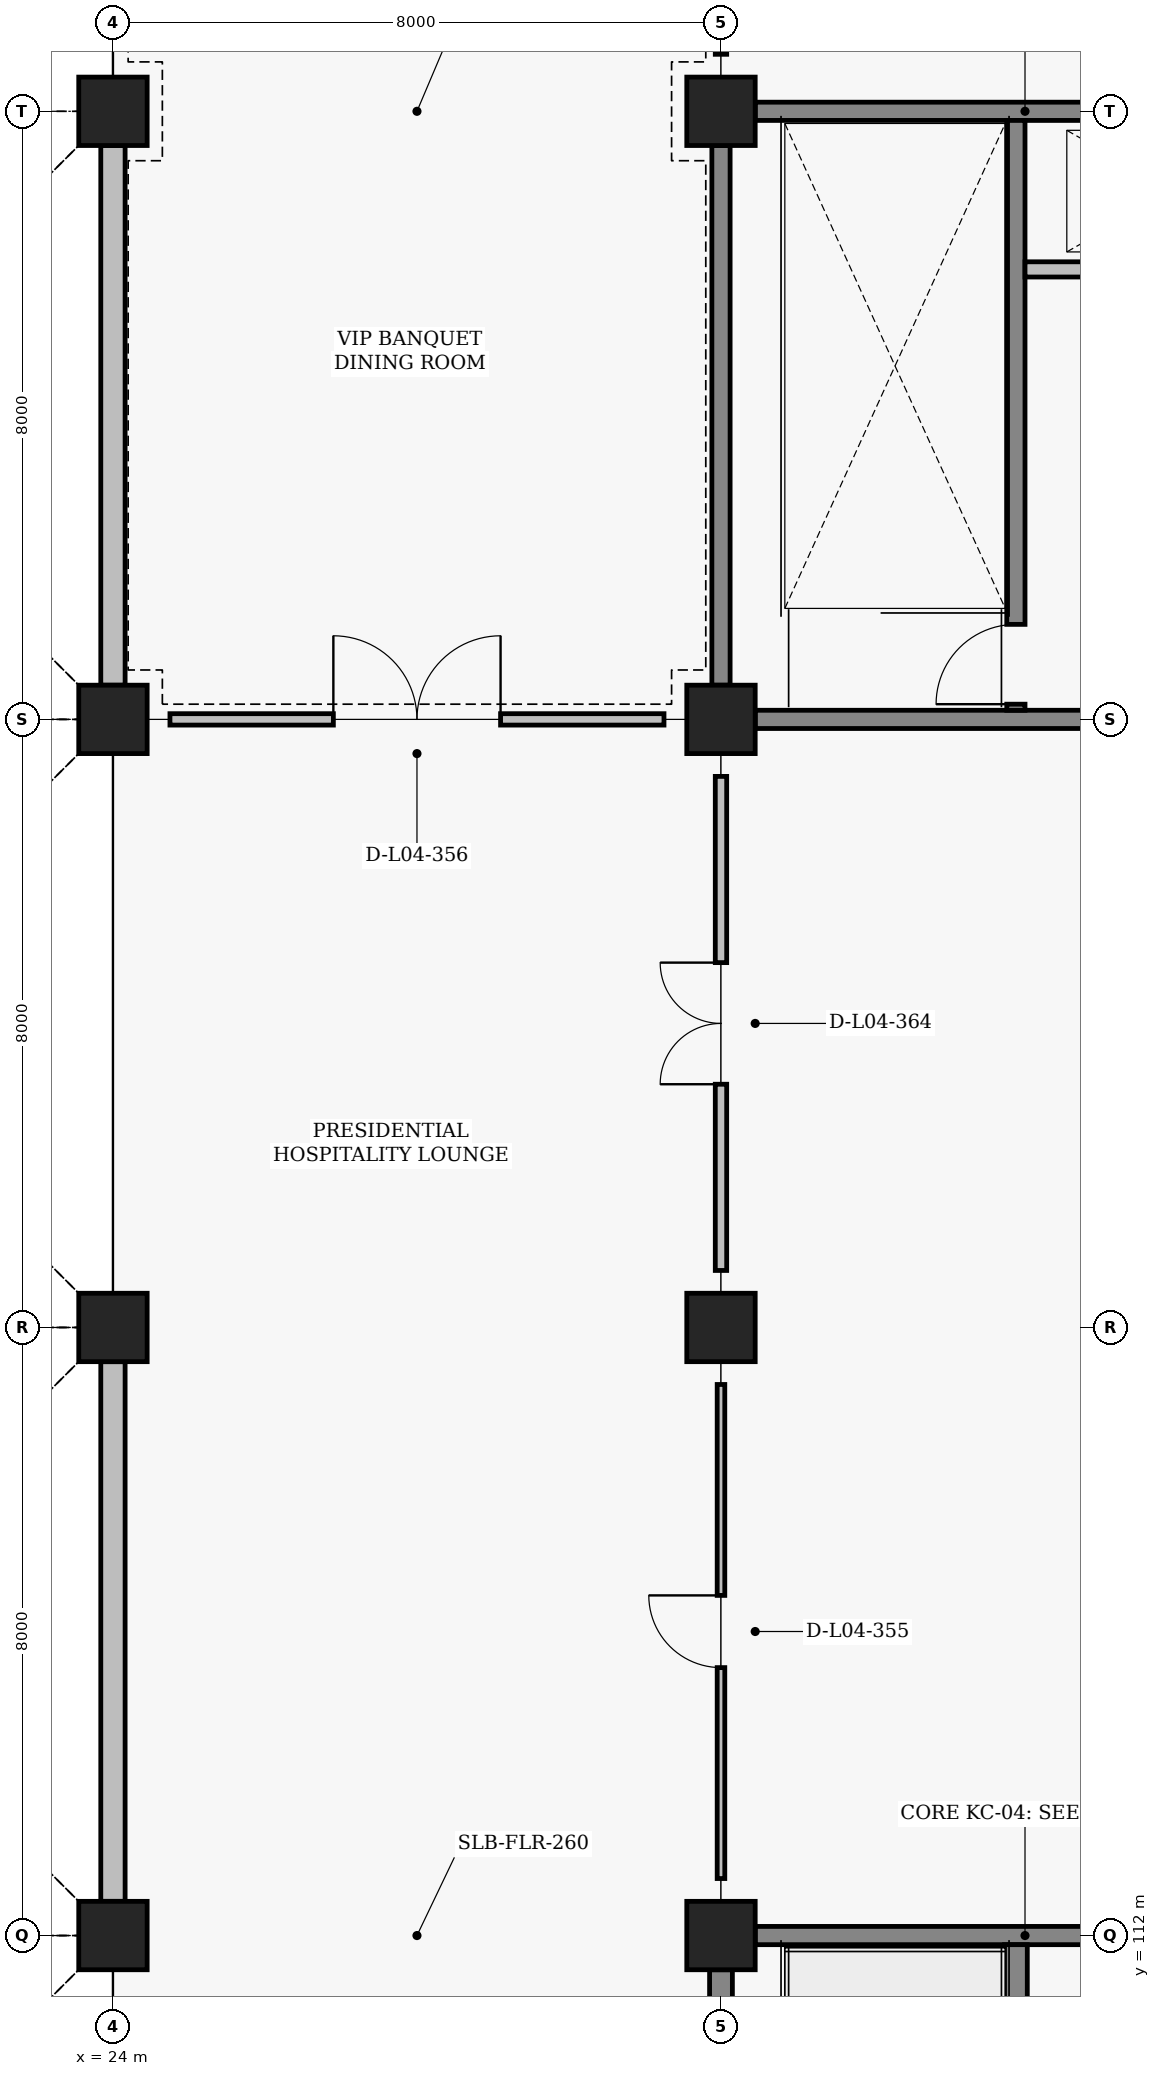
"""IFC4 building model, lengths in metres.
Left out: names, types, materials, properties, quantities, classifications, styles, units other than length and angle.
Written with IfcOpenShell. Run it as: python <this file> out.ifc"""

import sys

from ifc_helpers import new_model, si_unit, direction, frame, frame_2d, origin, origin_2d, place, context, subcontext, project, spatial, rectangle, extrude, element, fill, save


model = new_model("IFC4")
c1 = context("Model", 3, precision=1e-05, world=origin(), true_north=direction((0.0, 1.0)))
c2 = subcontext(c1, "Body", "Model", "MODEL_VIEW")
j1 = project(units=[si_unit("LENGTHUNIT", "METRE"), si_unit("PLANEANGLEUNIT", "RADIAN")], contexts=[c1])
p1 = place(None, origin())
s1 = spatial("IfcSite", under=j1, at=p1, CompositionType="ELEMENT")
p2 = place(p1, origin())
s2 = spatial("IfcBuilding", under=s1, at=p2, CompositionType="ELEMENT")
p3 = place(p2, frame((0.0, 0.0, 14.4)))
s3 = spatial("IfcBuildingStorey", under=s2, at=p3, CompositionType="ELEMENT", Elevation=14.4)
for number, where, z_axis, x_axis in (
    (1, (24.0, 112.0, 0.0), (0.0, 0.0, 1.0), (1.0, 0.0, 0.0)),
    (2, (24.0, 120.0, 0.0), (0.0, 0.0, 1.0), (1.0, 0.0, 0.0)),
    (3, (24.0, 128.0, 0.0), (0.0, 0.0, 1.0), (1.0, 0.0, 0.0)),
    (4, (24.0, 136.0, 0.0), (0.0, 0.0, 1.0), (1.0, 0.0, 0.0)),
    (5, (32.0, 112.0, 0.0), (0.0, 0.0, 1.0), (1.0, 0.0, 0.0)),
    (6, (32.0, 120.0, 0.0), (0.0, 0.0, 1.0), (1.0, 0.0, 0.0)),
    (7, (32.0, 128.0, 0.0), (0.0, 0.0, 1.0), (1.0, 0.0, 0.0)),
    (8, (32.0, 136.0, 0.0), (0.0, 0.0, 1.0), (1.0, 0.0, 0.0)),
):
    element("IfcColumn", number, at=place(p3, frame(where, z_axis=z_axis, x_axis=x_axis)), inside=s3, PredefinedType="COLUMN", context=c2, shape_type="SweptSolid", body=[
        extrude(rectangle(XDim=0.9, YDim=0.9, at=origin_2d()), origin(), (0.0, 0.0, 1.0), 4.2),
    ])
for number, where, z_axis, x_axis in (
    (9, (24.0, 112.45, 0.0), (0.0, 0.0, 1.0), (0.0, 1.0, 0.0)),
    (10, (24.0, 128.45, 0.0), (0.0, 0.0, 1.0), (0.0, 1.0, 0.0)),
):
    element("IfcWall", number, at=place(p3, frame(where, z_axis=z_axis, x_axis=x_axis)), inside=s3, PredefinedType="SOLIDWALL", context=c2, shape_type="SweptSolid", body=[
        extrude(rectangle(XDim=7.1, YDim=0.32, at=frame_2d((3.55, 0.0))), origin(), (0.0, 0.0, 1.0), 3.33),
    ])
p4 = place(p3, frame((32.45, 112.0, 0.0), z_axis=(0.0, 0.0, 1.0), x_axis=(1.0, 0.0, 0.0)))
e11 = element("IfcWall", 11, at=p4, inside=s3, PredefinedType="SHEAR", context=c2, shape_type="SweptSolid", body=[
    extrude(rectangle(XDim=7.1, YDim=0.24, at=frame_2d((3.55, 0.0))), origin(), (0.0, 0.0, 1.0), 3.33),
])
p5 = place(p3, frame((32.0, 104.45, 0.0), z_axis=(0.0, 0.0, 1.0), x_axis=(0.0, 1.0, 0.0)))
e12 = element("IfcWall", 12, at=p5, inside=s3, PredefinedType="SHEAR", context=c2, shape_type="SweptSolid", body=[
    extrude(rectangle(XDim=7.1, YDim=0.3, at=frame_2d((3.55, 0.0))), origin(), (0.0, 0.0, 1.0), 3.33),
])
p6 = place(p3, frame((35.88, 104.12, 0.0), z_axis=(0.0, 0.0, 1.0), x_axis=(0.0, 1.0, 0.0)))
e13 = element("IfcWall", 13, at=p6, inside=s3, PredefinedType="SHEAR", context=c2, shape_type="SweptSolid", body=[
    extrude(rectangle(XDim=7.76, YDim=0.3, at=frame_2d((3.88, 0.0))), origin(), (0.0, 0.0, 1.0), 3.43),
])
p7 = place(p6, frame((0.08, 0.0, 0.0)))
e14 = element("IfcOpeningElement", 14, at=p7, cuts=e13, PredefinedType="OPENING", context=c2, shape_type="SweptSolid", body=[
    extrude(rectangle(XDim=1.05, YDim=2.15, at=frame_2d((0.525, 1.075))), frame((0.0, 0.16, 0.0), z_axis=(0.0, -1.0, 0.0), x_axis=(1.0, 0.0, 0.0)), (0.0, 0.0, 1.0), 0.32),
])
p8 = place(p3, frame((32.45, 128.0, 0.0), z_axis=(0.0, 0.0, 1.0), x_axis=(1.0, 0.0, 0.0)))
e15 = element("IfcWall", 15, at=p8, inside=s3, PredefinedType="SHEAR", context=c2, shape_type="SweptSolid", body=[
    extrude(rectangle(XDim=7.1, YDim=0.24, at=frame_2d((3.55, 0.0))), origin(), (0.0, 0.0, 1.0), 3.33),
])
p9 = place(p8, frame((4.95, 0.0, 0.0)))
e16 = element("IfcOpeningElement", 16, at=p9, cuts=e15, PredefinedType="OPENING", context=c2, shape_type="SweptSolid", body=[
    extrude(rectangle(XDim=1.1, YDim=2.2, at=frame_2d((0.55, 1.1))), frame((0.0, 0.13, 0.0), z_axis=(0.0, -1.0, 0.0), x_axis=(1.0, 0.0, 0.0)), (0.0, 0.0, 1.0), 0.26),
])
for number, where, z_axis, x_axis in (
    (17, (32.45, 136.0, 0.0), (0.0, 0.0, 1.0), (1.0, 0.0, 0.0)),
    (18, (32.0, 128.45, 0.0), (0.0, 0.0, 1.0), (0.0, 1.0, 0.0)),
):
    element("IfcWall", number, at=place(p3, frame(where, z_axis=z_axis, x_axis=x_axis)), inside=s3, PredefinedType="SHEAR", context=c2, shape_type="SweptSolid", body=[
        extrude(rectangle(XDim=7.1, YDim=0.24, at=frame_2d((3.55, 0.0))), origin(), (0.0, 0.0, 1.0), 3.33),
    ])
p10 = place(p3, frame((35.88, 128.12, 0.0), z_axis=(0.0, 0.0, 1.0), x_axis=(0.0, 1.0, 0.0)))
e19 = element("IfcWall", 19, at=p10, inside=s3, PredefinedType="SHEAR", context=c2, shape_type="SweptSolid", body=[
    extrude(rectangle(XDim=7.76, YDim=0.24, at=frame_2d((3.88, 0.0))), origin(), (0.0, 0.0, 1.0), 3.43),
])
p11 = place(p10, frame((0.08, 0.0, 0.0)))
e20 = element("IfcOpeningElement", 20, at=p11, cuts=e19, PredefinedType="OPENING", context=c2, shape_type="SweptSolid", body=[
    extrude(rectangle(XDim=1.05, YDim=2.15, at=frame_2d((0.525, 1.075))), frame((0.0, 0.13, 0.0), z_axis=(0.0, -1.0, 0.0), x_axis=(1.0, 0.0, 0.0)), (0.0, 0.0, 1.0), 0.26),
])
p12 = place(p3, frame((36.0, 133.92, 0.0), z_axis=(0.0, 0.0, 1.0), x_axis=(1.0, 0.0, 0.0)))
e21 = element("IfcWall", 21, at=p12, inside=s3, PredefinedType="PARTITIONING", context=c2, shape_type="SweptSolid", body=[
    extrude(rectangle(XDim=3.88, YDim=0.2, at=frame_2d((1.94, 0.0))), origin(), (0.0, 0.0, 1.0), 3.33),
])
p13 = place(p12, frame((1.25, 0.0, 0.0)))
e22 = element("IfcOpeningElement", 22, at=p13, cuts=e21, PredefinedType="OPENING", context=c2, shape_type="SweptSolid", body=[
    extrude(rectangle(XDim=0.85, YDim=2.05, at=frame_2d((0.425, 1.025))), frame((0.0, 0.11, 0.0), z_axis=(0.0, -1.0, 0.0), x_axis=(1.0, 0.0, 0.0)), (0.0, 0.0, 1.0), 0.22),
])
p14 = place(p3, frame((32.0, 112.75, 0.0), z_axis=(0.0, 0.0, 1.0), x_axis=(0.0, 1.0, 0.0)))
e23 = element("IfcWall", 23, at=p14, inside=s3, PredefinedType="PARTITIONING", context=c2, shape_type="SweptSolid", body=[
    extrude(rectangle(XDim=6.5, YDim=0.1, at=frame_2d((3.25, 0.0))), origin(), (0.0, 0.0, 1.0), 3.33),
])
p15 = place(p14, frame((2.775, 0.0, 0.0)))
e24 = element("IfcOpeningElement", 24, at=p15, cuts=e23, PredefinedType="OPENING", context=c2, shape_type="SweptSolid", body=[
    extrude(rectangle(XDim=0.95, YDim=2.1, at=frame_2d((0.475, 1.05))), frame((0.0, 0.06, 0.0), z_axis=(0.0, -1.0, 0.0), x_axis=(1.0, 0.0, 0.0)), (0.0, 0.0, 1.0), 0.12),
])
p16 = place(p3, frame((24.75, 128.0, 0.0), z_axis=(0.0, 0.0, 1.0), x_axis=(1.0, 0.0, 0.0)))
e25 = element("IfcWall", 25, at=p16, inside=s3, PredefinedType="PARTITIONING", context=c2, shape_type="SweptSolid", body=[
    extrude(rectangle(XDim=6.5, YDim=0.15, at=frame_2d((3.25, 0.0))), origin(), (0.0, 0.0, 1.0), 3.43),
])
p17 = place(p16, frame((2.15, 0.0, 0.0)))
e26 = element("IfcOpeningElement", 26, at=p17, cuts=e25, PredefinedType="OPENING", context=c2, shape_type="SweptSolid", body=[
    extrude(rectangle(XDim=2.2, YDim=2.4, at=frame_2d((1.1, 1.2))), frame((0.0, 0.085, 0.0), z_axis=(0.0, -1.0, 0.0), x_axis=(1.0, 0.0, 0.0)), (0.0, 0.0, 1.0), 0.17),
])
p18 = place(p3, frame((32.0, 120.75, 0.0), z_axis=(0.0, 0.0, 1.0), x_axis=(0.0, 1.0, 0.0)))
e27 = element("IfcWall", 27, at=p18, inside=s3, PredefinedType="PARTITIONING", context=c2, shape_type="SweptSolid", body=[
    extrude(rectangle(XDim=6.5, YDim=0.15, at=frame_2d((3.25, 0.0))), origin(), (0.0, 0.0, 1.0), 3.33),
])
p19 = place(p18, frame((2.45, 0.0, 0.0)))
e28 = element("IfcOpeningElement", 28, at=p19, cuts=e27, PredefinedType="OPENING", context=c2, shape_type="SweptSolid", body=[
    extrude(rectangle(XDim=1.6, YDim=2.2, at=frame_2d((0.8, 1.1))), frame((0.0, 0.085, 0.0), z_axis=(0.0, -1.0, 0.0), x_axis=(1.0, 0.0, 0.0)), (0.0, 0.0, 1.0), 0.17),
])
p20 = place(p3, frame((32.0, 136.75, 0.0), z_axis=(0.0, 0.0, 1.0), x_axis=(0.0, 1.0, 0.0)))
e29 = element("IfcWall", 29, at=p20, inside=s3, PredefinedType="PARTITIONING", context=c2, shape_type="SweptSolid", body=[
    extrude(rectangle(XDim=6.5, YDim=0.15, at=frame_2d((3.25, 0.0))), origin(), (0.0, 0.0, 1.0), 3.33),
])
p21 = place(p20, frame((2.15, 0.0, 0.0)))
e30 = element("IfcOpeningElement", 30, at=p21, cuts=e29, PredefinedType="OPENING", context=c2, shape_type="SweptSolid", body=[
    extrude(rectangle(XDim=2.2, YDim=2.4, at=frame_2d((1.1, 1.2))), frame((0.0, 0.085, 0.0), z_axis=(0.0, -1.0, 0.0), x_axis=(1.0, 0.0, 0.0)), (0.0, 0.0, 1.0), 0.17),
])
p22 = place(p11, origin())
e31 = element("IfcDoor", 31, at=p22, inside=s3, OperationType="SINGLE_SWING_LEFT", PredefinedType="DOOR", context=c2, shape_type="SweptSolid", body=[
    extrude(rectangle(XDim=1.05, YDim=2.15, at=frame_2d((0.525, 1.075))), frame((0.0, 0.025, 0.0), z_axis=(0.0, -1.0, 0.0), x_axis=(1.0, 0.0, 0.0)), (0.0, 0.0, 1.0), 0.05),
])
fill(e20, e31)
p23 = place(p15, origin())
e32 = element("IfcDoor", 32, at=p23, inside=s3, OperationType="SINGLE_SWING_RIGHT", PredefinedType="DOOR", context=c2, shape_type="SweptSolid", body=[
    extrude(rectangle(XDim=0.95, YDim=2.1, at=frame_2d((0.475, 1.05))), frame((0.0, 0.025, 0.0), z_axis=(0.0, -1.0, 0.0), x_axis=(1.0, 0.0, 0.0)), (0.0, 0.0, 1.0), 0.05),
])
fill(e24, e32)
p24 = place(p17, origin())
e33 = element("IfcDoor", 33, at=p24, inside=s3, OperationType="DOUBLE_SWING_LEFT", PredefinedType="DOOR", context=c2, shape_type="SweptSolid", body=[
    extrude(rectangle(XDim=2.2, YDim=2.4, at=frame_2d((1.1, 1.2))), frame((0.0, 0.025, 0.0), z_axis=(0.0, -1.0, 0.0), x_axis=(1.0, 0.0, 0.0)), (0.0, 0.0, 1.0), 0.05),
])
fill(e26, e33)
p25 = place(p19, origin())
e34 = element("IfcDoor", 34, at=p25, inside=s3, OperationType="DOUBLE_SWING_LEFT", PredefinedType="DOOR", context=c2, shape_type="SweptSolid", body=[
    extrude(rectangle(XDim=1.6, YDim=2.2, at=frame_2d((0.8, 1.1))), frame((0.0, 0.025, 0.0), z_axis=(0.0, -1.0, 0.0), x_axis=(1.0, 0.0, 0.0)), (0.0, 0.0, 1.0), 0.05),
])
fill(e28, e34)
save(model, sys.argv[1])
